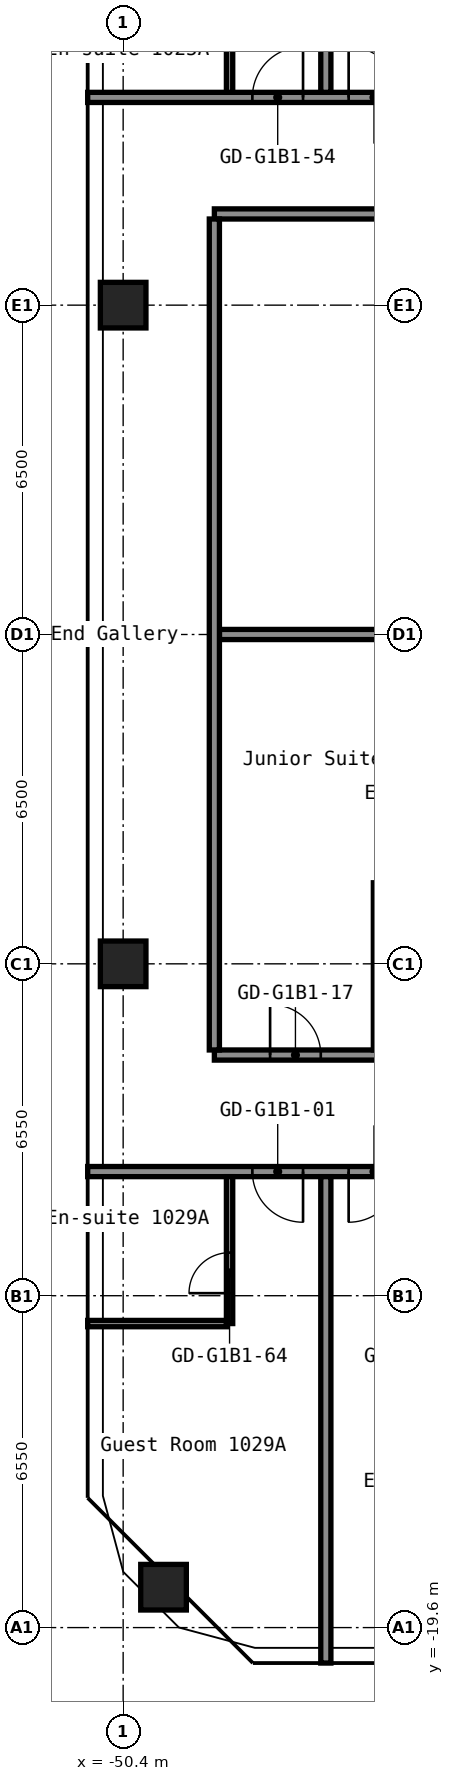
"""IFC4 building model, lengths in metres.
Left out: names, types, materials, properties, quantities, classifications, styles, units other than length and angle.
Written with IfcOpenShell. Run it as: python <this file> out.ifc"""

import sys

from ifc_helpers import new_model, si_unit, direction, frame, frame_2d, origin, origin_2d, place, context, subcontext, project, spatial, rectangle, hollow_rectangle, extrude, element, fill, save


model = new_model("IFC4")
c1 = context("Model", 3, precision=1e-05, world=origin(), true_north=direction((0.0, 1.0)))
c2 = subcontext(c1, "Body", "Model", "MODEL_VIEW")
j1 = project(units=[si_unit("LENGTHUNIT", "METRE"), si_unit("PLANEANGLEUNIT", "RADIAN")], contexts=[c1])
p1 = place(None, origin())
s1 = spatial("IfcSite", under=j1, at=p1, CompositionType="ELEMENT")
p2 = place(p1, origin())
s2 = spatial("IfcBuilding", under=s1, at=p2, CompositionType="ELEMENT")
p3 = place(p2, frame((0.0, 0.0, 39.0)))
s3 = spatial("IfcBuildingStorey", under=s2, at=p3, CompositionType="ELEMENT", Elevation=39.0)
for number, where, z_axis, x_axis in (
    (1, (-49.603, -18.803, 0.0), (0.0, 0.0, 1.0), (1.0, 0.0, 0.0)),
    (2, (-50.4, -6.5, 0.0), (0.0, 0.0, 1.0), (1.0, 0.0, 0.0)),
    (3, (-50.4, 6.5, 0.0), (0.0, 0.0, 1.0), (1.0, 0.0, 0.0)),
):
    element("IfcColumn", number, at=place(p3, frame(where, z_axis=z_axis, x_axis=x_axis)), inside=s3, PredefinedType="COLUMN", context=c2, shape_type="SweptSolid", body=[
        extrude(hollow_rectangle(XDim=0.9, YDim=0.9, WallThickness=0.036, at=origin_2d()), origin(), (0.0, 0.0, 1.0), 2.8),
    ])
p4 = place(p3, frame((-51.1, -13.6, 0.0), z_axis=(0.0, 0.0, 1.0), x_axis=(1.0, 0.0, 0.0)))
e4 = element("IfcWall", 4, at=p4, inside=s3, PredefinedType="PARTITIONING", context=c2, shape_type="SweptSolid", body=[
    extrude(rectangle(XDim=2.738, YDim=0.125, at=frame_2d((1.369, 0.0))), origin(), (0.0, 0.0, 1.0), 2.8),
])
p5 = place(p3, frame((-51.1, -10.6, 0.0), z_axis=(0.0, 0.0, 1.0), x_axis=(1.0, 0.0, 0.0)))
e5 = element("IfcWall", 5, at=p5, inside=s3, PredefinedType="PARTITIONING", context=c2, shape_type="SweptSolid", body=[
    extrude(rectangle(XDim=34.3, YDim=0.2, at=frame_2d((17.15, 0.0))), origin(), (0.0, 0.0, 1.0), 2.8),
])
p6 = place(p5, frame((3.25, 0.0, 0.0)))
e6 = element("IfcOpeningElement", 6, at=p6, cuts=e5, PredefinedType="OPENING", context=c2, shape_type="SweptSolid", body=[
    extrude(rectangle(XDim=1.0, YDim=2.1, at=frame_2d((0.5, 1.05))), frame((0.0, 0.11, 0.0), z_axis=(0.0, -1.0, 0.0), x_axis=(1.0, 0.0, 0.0)), (0.0, 0.0, 1.0), 0.22),
])
p7 = place(p5, frame((5.15, 0.0, 0.0)))
e7 = element("IfcOpeningElement", 7, at=p7, cuts=e5, PredefinedType="OPENING", context=c2, shape_type="SweptSolid", body=[
    extrude(rectangle(XDim=1.0, YDim=2.1, at=frame_2d((0.5, 1.05))), frame((0.0, 0.11, 0.0), z_axis=(0.0, -1.0, 0.0), x_axis=(1.0, 0.0, 0.0)), (0.0, 0.0, 1.0), 0.22),
])
p8 = place(p5, frame((11.95, 0.0, 0.0)))
e8 = element("IfcOpeningElement", 8, at=p8, cuts=e5, PredefinedType="OPENING", context=c2, shape_type="SweptSolid", body=[
    extrude(rectangle(XDim=1.0, YDim=2.1, at=frame_2d((0.5, 1.05))), frame((0.0, 0.11, 0.0), z_axis=(0.0, -1.0, 0.0), x_axis=(1.0, 0.0, 0.0)), (0.0, 0.0, 1.0), 0.22),
])
p9 = place(p5, frame((13.65, 0.0, 0.0)))
e9 = element("IfcOpeningElement", 9, at=p9, cuts=e5, PredefinedType="OPENING", context=c2, shape_type="SweptSolid", body=[
    extrude(rectangle(XDim=1.0, YDim=2.1, at=frame_2d((0.5, 1.05))), frame((0.0, 0.11, 0.0), z_axis=(0.0, -1.0, 0.0), x_axis=(1.0, 0.0, 0.0)), (0.0, 0.0, 1.0), 0.22),
])
p10 = place(p5, frame((20.35, 0.0, 0.0)))
e10 = element("IfcOpeningElement", 10, at=p10, cuts=e5, PredefinedType="OPENING", context=c2, shape_type="SweptSolid", body=[
    extrude(rectangle(XDim=1.0, YDim=2.1, at=frame_2d((0.5, 1.05))), frame((0.0, 0.11, 0.0), z_axis=(0.0, -1.0, 0.0), x_axis=(1.0, 0.0, 0.0)), (0.0, 0.0, 1.0), 0.22),
])
p11 = place(p5, frame((22.05, 0.0, 0.0)))
e11 = element("IfcOpeningElement", 11, at=p11, cuts=e5, PredefinedType="OPENING", context=c2, shape_type="SweptSolid", body=[
    extrude(rectangle(XDim=1.0, YDim=2.1, at=frame_2d((0.5, 1.05))), frame((0.0, 0.11, 0.0), z_axis=(0.0, -1.0, 0.0), x_axis=(1.0, 0.0, 0.0)), (0.0, 0.0, 1.0), 0.22),
])
p12 = place(p5, frame((28.75, 0.0, 0.0)))
e12 = element("IfcOpeningElement", 12, at=p12, cuts=e5, PredefinedType="OPENING", context=c2, shape_type="SweptSolid", body=[
    extrude(rectangle(XDim=1.0, YDim=2.1, at=frame_2d((0.5, 1.05))), frame((0.0, 0.11, 0.0), z_axis=(0.0, -1.0, 0.0), x_axis=(1.0, 0.0, 0.0)), (0.0, 0.0, 1.0), 0.22),
])
p13 = place(p5, frame((30.45, 0.0, 0.0)))
e13 = element("IfcOpeningElement", 13, at=p13, cuts=e5, PredefinedType="OPENING", context=c2, shape_type="SweptSolid", body=[
    extrude(rectangle(XDim=1.0, YDim=2.1, at=frame_2d((0.5, 1.05))), frame((0.0, 0.11, 0.0), z_axis=(0.0, -1.0, 0.0), x_axis=(1.0, 0.0, 0.0)), (0.0, 0.0, 1.0), 0.22),
])
p14 = place(p3, frame((-48.6, -8.3, 0.0), z_axis=(0.0, 0.0, 1.0), x_axis=(1.0, 0.0, 0.0)))
e14 = element("IfcWall", 14, at=p14, inside=s3, PredefinedType="PARTITIONING", context=c2, shape_type="SweptSolid", body=[
    extrude(rectangle(XDim=15.0, YDim=0.2, at=frame_2d((7.5, 0.0))), origin(), (0.0, 0.0, 1.0), 2.8),
])
p15 = place(p14, frame((1.1, 0.0, 0.0)))
e15 = element("IfcOpeningElement", 15, at=p15, cuts=e14, PredefinedType="OPENING", context=c2, shape_type="SweptSolid", body=[
    extrude(rectangle(XDim=1.0, YDim=2.1, at=frame_2d((0.5, 1.05))), frame((0.0, 0.11, 0.0), z_axis=(0.0, -1.0, 0.0), x_axis=(1.0, 0.0, 0.0)), (0.0, 0.0, 1.0), 0.22),
])
p16 = place(p14, frame((12.0, 0.0, 0.0)))
e16 = element("IfcOpeningElement", 16, at=p16, cuts=e14, PredefinedType="OPENING", context=c2, shape_type="SweptSolid", body=[
    extrude(rectangle(XDim=1.0, YDim=2.1, at=frame_2d((0.5, 1.05))), frame((0.0, 0.11, 0.0), z_axis=(0.0, -1.0, 0.0), x_axis=(1.0, 0.0, 0.0)), (0.0, 0.0, 1.0), 0.22),
])
p17 = place(p3, frame((-48.5, 0.0, 0.0), z_axis=(0.0, 0.0, 1.0), x_axis=(1.0, 0.0, 0.0)))
e17 = element("IfcWall", 17, at=p17, inside=s3, PredefinedType="PARTITIONING", context=c2, shape_type="SweptSolid", body=[
    extrude(rectangle(XDim=14.9, YDim=0.2, at=frame_2d((7.45, 0.0))), origin(), (0.0, 0.0, 1.0), 2.8),
])
p18 = place(p3, frame((-48.6, 8.3, 0.0), z_axis=(0.0, 0.0, 1.0), x_axis=(1.0, 0.0, 0.0)))
e18 = element("IfcWall", 18, at=p18, inside=s3, PredefinedType="PARTITIONING", context=c2, shape_type="SweptSolid", body=[
    extrude(rectangle(XDim=15.0, YDim=0.2, at=frame_2d((7.5, 0.0))), origin(), (0.0, 0.0, 1.0), 2.8),
])
p19 = place(p18, frame((9.1, 0.0, 0.0)))
e19 = element("IfcOpeningElement", 19, at=p19, cuts=e18, PredefinedType="OPENING", context=c2, shape_type="SweptSolid", body=[
    extrude(rectangle(XDim=1.0, YDim=2.1, at=frame_2d((0.5, 1.05))), frame((0.0, 0.11, 0.0), z_axis=(0.0, -1.0, 0.0), x_axis=(1.0, 0.0, 0.0)), (0.0, 0.0, 1.0), 0.22),
])
p20 = place(p3, frame((-51.1, 10.6, 0.0), z_axis=(0.0, 0.0, 1.0), x_axis=(1.0, 0.0, 0.0)))
e20 = element("IfcWall", 20, at=p20, inside=s3, PredefinedType="PARTITIONING", context=c2, shape_type="SweptSolid", body=[
    extrude(rectangle(XDim=34.3, YDim=0.2, at=frame_2d((17.15, 0.0))), origin(), (0.0, 0.0, 1.0), 2.8),
])
p21 = place(p20, frame((3.25, 0.0, 0.0)))
e21 = element("IfcOpeningElement", 21, at=p21, cuts=e20, PredefinedType="OPENING", context=c2, shape_type="SweptSolid", body=[
    extrude(rectangle(XDim=1.0, YDim=2.1, at=frame_2d((0.5, 1.05))), frame((0.0, 0.11, 0.0), z_axis=(0.0, -1.0, 0.0), x_axis=(1.0, 0.0, 0.0)), (0.0, 0.0, 1.0), 0.22),
])
p22 = place(p20, frame((5.15, 0.0, 0.0)))
e22 = element("IfcOpeningElement", 22, at=p22, cuts=e20, PredefinedType="OPENING", context=c2, shape_type="SweptSolid", body=[
    extrude(rectangle(XDim=1.0, YDim=2.1, at=frame_2d((0.5, 1.05))), frame((0.0, 0.11, 0.0), z_axis=(0.0, -1.0, 0.0), x_axis=(1.0, 0.0, 0.0)), (0.0, 0.0, 1.0), 0.22),
])
p23 = place(p20, frame((14.6, 0.0, 0.0)))
e23 = element("IfcOpeningElement", 23, at=p23, cuts=e20, PredefinedType="OPENING", context=c2, shape_type="SweptSolid", body=[
    extrude(rectangle(XDim=1.0, YDim=2.1, at=frame_2d((0.5, 1.05))), frame((0.0, 0.11, 0.0), z_axis=(0.0, -1.0, 0.0), x_axis=(1.0, 0.0, 0.0)), (0.0, 0.0, 1.0), 0.22),
])
p24 = place(p20, frame((19.4, 0.0, 0.0)))
e24 = element("IfcOpeningElement", 24, at=p24, cuts=e20, PredefinedType="OPENING", context=c2, shape_type="SweptSolid", body=[
    extrude(rectangle(XDim=1.0, YDim=2.1, at=frame_2d((0.5, 1.05))), frame((0.0, 0.11, 0.0), z_axis=(0.0, -1.0, 0.0), x_axis=(1.0, 0.0, 0.0)), (0.0, 0.0, 1.0), 0.22),
])
p25 = place(p20, frame((28.75, 0.0, 0.0)))
e25 = element("IfcOpeningElement", 25, at=p25, cuts=e20, PredefinedType="OPENING", context=c2, shape_type="SweptSolid", body=[
    extrude(rectangle(XDim=1.0, YDim=2.1, at=frame_2d((0.5, 1.05))), frame((0.0, 0.11, 0.0), z_axis=(0.0, -1.0, 0.0), x_axis=(1.0, 0.0, 0.0)), (0.0, 0.0, 1.0), 0.22),
])
p26 = place(p20, frame((30.45, 0.0, 0.0)))
e26 = element("IfcOpeningElement", 26, at=p26, cuts=e20, PredefinedType="OPENING", context=c2, shape_type="SweptSolid", body=[
    extrude(rectangle(XDim=1.0, YDim=2.1, at=frame_2d((0.5, 1.05))), frame((0.0, 0.11, 0.0), z_axis=(0.0, -1.0, 0.0), x_axis=(1.0, 0.0, 0.0)), (0.0, 0.0, 1.0), 0.22),
])
p27 = place(p3, frame((-48.6, -8.2, 0.0), z_axis=(0.0, 0.0, 1.0), x_axis=(0.0, 1.0, 0.0)))
e27 = element("IfcWall", 27, at=p27, inside=s3, PredefinedType="PARTITIONING", context=c2, shape_type="SweptSolid", body=[
    extrude(rectangle(XDim=16.4, YDim=0.2, at=frame_2d((8.2, 0.0))), origin(), (0.0, 0.0, 1.0), 2.8),
])
p28 = place(p3, frame((-48.3, -13.6, 0.0), z_axis=(0.0, 0.0, 1.0), x_axis=(0.0, 1.0, 0.0)))
e28 = element("IfcWall", 28, at=p28, inside=s3, PredefinedType="PARTITIONING", context=c2, shape_type="SweptSolid", body=[
    extrude(rectangle(XDim=2.9, YDim=0.125, at=frame_2d((1.45, 0.0))), origin(), (0.0, 0.0, 1.0), 2.8),
])
p29 = place(p28, frame((0.6, 0.0, 0.0)))
e29 = element("IfcOpeningElement", 29, at=p29, cuts=e28, PredefinedType="OPENING", context=c2, shape_type="SweptSolid", body=[
    extrude(rectangle(XDim=0.8, YDim=2.1, at=frame_2d((0.4, 1.05))), frame((0.0, 0.073, 0.0), z_axis=(0.0, -1.0, 0.0), x_axis=(1.0, 0.0, 0.0)), (0.0, 0.0, 1.0), 0.145),
])
p30 = place(p3, frame((-48.3, 10.7, 0.0), z_axis=(0.0, 0.0, 1.0), x_axis=(0.0, 1.0, 0.0)))
e30 = element("IfcWall", 30, at=p30, inside=s3, PredefinedType="PARTITIONING", context=c2, shape_type="SweptSolid", body=[
    extrude(rectangle(XDim=2.9, YDim=0.125, at=frame_2d((1.45, 0.0))), origin(), (0.0, 0.0, 1.0), 2.8),
])
p31 = place(p30, frame((1.5, 0.0, 0.0)))
e31 = element("IfcOpeningElement", 31, at=p31, cuts=e30, PredefinedType="OPENING", context=c2, shape_type="SweptSolid", body=[
    extrude(rectangle(XDim=0.8, YDim=2.1, at=frame_2d((0.4, 1.05))), frame((0.0, 0.073, 0.0), z_axis=(0.0, -1.0, 0.0), x_axis=(1.0, 0.0, 0.0)), (0.0, 0.0, 1.0), 0.145),
])
for number, where, z_axis, x_axis in (
    (32, (-46.4, -20.3, 0.0), (0.0, 0.0, 1.0), (0.0, 1.0, 0.0)),
    (33, (-46.4, 10.7, 0.0), (0.0, 0.0, 1.0), (0.0, 1.0, 0.0)),
):
    element("IfcWall", number, at=place(p3, frame(where, z_axis=z_axis, x_axis=x_axis)), inside=s3, PredefinedType="PARTITIONING", context=c2, shape_type="SweptSolid", body=[
        extrude(rectangle(XDim=9.6, YDim=0.2, at=frame_2d((4.8, 0.0))), origin(), (0.0, 0.0, 1.0), 2.8),
    ])
p32 = place(p3, frame((-45.4, -8.2, 0.0), z_axis=(0.0, 0.0, 1.0), x_axis=(0.0, 1.0, 0.0)))
e34 = element("IfcWall", 34, at=p32, inside=s3, PredefinedType="PARTITIONING", context=c2, shape_type="SweptSolid", body=[
    extrude(rectangle(XDim=3.3, YDim=0.125, at=frame_2d((1.65, 0.0))), origin(), (0.0, 0.0, 1.0), 2.8),
])
p33 = place(p6, origin())
e35 = element("IfcDoor", 35, at=p33, inside=s3, OperationType="SINGLE_SWING_RIGHT", PredefinedType="DOOR", context=c2, shape_type="SweptSolid", body=[
    extrude(rectangle(XDim=1.0, YDim=2.1, at=frame_2d((0.5, 1.05))), frame((0.0, 0.025, 0.0), z_axis=(0.0, -1.0, 0.0), x_axis=(1.0, 0.0, 0.0)), (0.0, 0.0, 1.0), 0.05),
])
fill(e6, e35)
p34 = place(p7, origin())
e36 = element("IfcDoor", 36, at=p34, inside=s3, OperationType="SINGLE_SWING_LEFT", PredefinedType="DOOR", context=c2, shape_type="SweptSolid", body=[
    extrude(rectangle(XDim=1.0, YDim=2.1, at=frame_2d((0.5, 1.05))), frame((0.0, 0.025, 0.0), z_axis=(0.0, -1.0, 0.0), x_axis=(1.0, 0.0, 0.0)), (0.0, 0.0, 1.0), 0.05),
])
fill(e7, e36)
p35 = place(p15, origin())
e37 = element("IfcDoor", 37, at=p35, inside=s3, OperationType="SINGLE_SWING_RIGHT", PredefinedType="DOOR", context=c2, shape_type="SweptSolid", body=[
    extrude(rectangle(XDim=1.0, YDim=2.1, at=frame_2d((0.5, 1.05))), frame((0.0, 0.025, 0.0), z_axis=(0.0, -1.0, 0.0), x_axis=(1.0, 0.0, 0.0)), (0.0, 0.0, 1.0), 0.05),
])
fill(e15, e37)
p36 = place(p21, origin())
e38 = element("IfcDoor", 38, at=p36, inside=s3, OperationType="SINGLE_SWING_LEFT", PredefinedType="DOOR", context=c2, shape_type="SweptSolid", body=[
    extrude(rectangle(XDim=1.0, YDim=2.1, at=frame_2d((0.5, 1.05))), frame((0.0, 0.025, 0.0), z_axis=(0.0, -1.0, 0.0), x_axis=(1.0, 0.0, 0.0)), (0.0, 0.0, 1.0), 0.05),
])
fill(e21, e38)
p37 = place(p22, origin())
e39 = element("IfcDoor", 39, at=p37, inside=s3, OperationType="SINGLE_SWING_RIGHT", PredefinedType="DOOR", context=c2, shape_type="SweptSolid", body=[
    extrude(rectangle(XDim=1.0, YDim=2.1, at=frame_2d((0.5, 1.05))), frame((0.0, 0.025, 0.0), z_axis=(0.0, -1.0, 0.0), x_axis=(1.0, 0.0, 0.0)), (0.0, 0.0, 1.0), 0.05),
])
fill(e22, e39)
p38 = place(p29, origin())
e40 = element("IfcDoor", 40, at=p38, inside=s3, OperationType="SINGLE_SWING_RIGHT", PredefinedType="DOOR", context=c2, shape_type="SweptSolid", body=[
    extrude(rectangle(XDim=0.8, YDim=2.1, at=frame_2d((0.4, 1.05))), frame((0.0, 0.025, 0.0), z_axis=(0.0, -1.0, 0.0), x_axis=(1.0, 0.0, 0.0)), (0.0, 0.0, 1.0), 0.05),
])
fill(e29, e40)
save(model, sys.argv[1])
